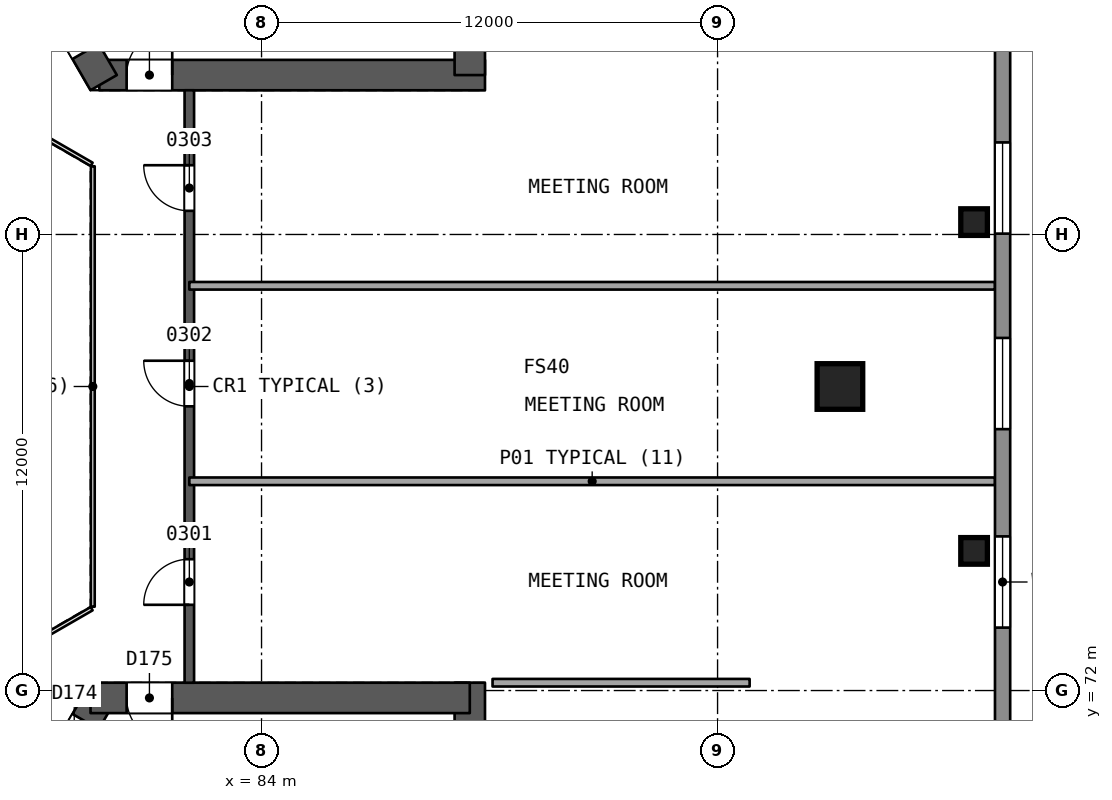
"""IFC4 building model, lengths in metres.
Left out: names, types, materials, properties, quantities, classifications, styles, units other than length and angle.
Written with IfcOpenShell. Run it as: python <this file> out.ifc"""

import sys

from ifc_helpers import new_model, si_unit, direction, frame, frame_2d, origin, origin_2d, place, context, subcontext, project, spatial, rectangle, extrude, element, fill, save


model = new_model("IFC4")
c1 = context("Model", 3, precision=1e-05, world=origin(), true_north=direction((0.0, 1.0)))
c2 = subcontext(c1, "Body", "Model", "MODEL_VIEW")
j1 = project(units=[si_unit("LENGTHUNIT", "METRE"), si_unit("PLANEANGLEUNIT", "RADIAN")], contexts=[c1])
p1 = place(None, origin())
s1 = spatial("IfcSite", under=j1, at=p1, CompositionType="ELEMENT")
p2 = place(p1, origin())
s2 = spatial("IfcBuilding", under=s1, at=p2, CompositionType="ELEMENT")
p3 = place(p2, frame((0.0, 0.0, 20.4)))
s3 = spatial("IfcBuildingStorey", under=s2, at=p3, CompositionType="ELEMENT", Elevation=20.4)
p4 = place(p3, frame((79.731, 88.194, 0.0), z_axis=(0.0, 0.0, 1.0), x_axis=(1.0, 0.0, 0.0)))
e1 = element("IfcWall", 1, at=p4, inside=s3, PredefinedType="SHEAR", context=c2, shape_type="SweptSolid", body=[
    extrude(rectangle(XDim=10.149, YDim=0.8, at=frame_2d((5.074, 0.0))), origin(), (0.0, 0.0, 1.0), 5.0),
])
p5 = place(p4, frame((0.719, 0.0, 0.0)))
e2 = element("IfcOpeningElement", 2, at=p5, cuts=e1, PredefinedType="OPENING", context=c2, shape_type="SweptSolid", body=[
    extrude(rectangle(XDim=1.2, YDim=2.1, at=frame_2d((0.6, 1.05))), frame((0.0, 0.411, 0.0), z_axis=(0.0, -1.0, 0.0), x_axis=(1.0, 0.0, 0.0)), (0.0, 0.0, 1.0), 0.821),
])
p6 = place(p3, frame((89.48, 88.194, 0.0), z_axis=(0.0, 0.0, 1.0), x_axis=(0.0, 1.0, 0.0)))
e3 = element("IfcWall", 3, at=p6, inside=s3, PredefinedType="SHEAR", context=c2, shape_type="SweptSolid", body=[
    extrude(rectangle(XDim=13.933, YDim=0.8, at=frame_2d((6.967, 0.0))), origin(), (0.0, 0.0, 1.0), 5.0),
])
p7 = place(p3, frame((74.856, 96.637, 0.0), z_axis=(0.0, 0.0, 1.0), x_axis=(0.499993500917, -0.866029155999, 0.0)))
e4 = element("IfcWall", 4, at=p7, inside=s3, PredefinedType="SHEAR", context=c2, shape_type="SweptSolid", body=[
    extrude(rectangle(XDim=9.98, YDim=0.8, at=frame_2d((4.99, 0.0))), origin(), (0.0, 0.0, 1.0), 5.0),
])
p8 = place(p7, frame((7.83, 0.0, 0.0)))
e5 = element("IfcOpeningElement", 5, at=p8, cuts=e4, PredefinedType="OPENING", context=c2, shape_type="SweptSolid", body=[
    extrude(rectangle(XDim=1.2, YDim=2.1, at=frame_2d((0.6, 1.05))), frame((0.0, 0.411, 0.0), z_axis=(0.0, -1.0, 0.0), x_axis=(1.0, 0.0, 0.0)), (0.0, 0.0, 1.0), 0.821),
])
p9 = place(p3, frame((79.731, 71.806, 0.0), z_axis=(0.0, 0.0, 1.0), x_axis=(-0.49999662545, -0.866027352073, 0.0)))
e6 = element("IfcWall", 6, at=p9, inside=s3, PredefinedType="SHEAR", context=c2, shape_type="SweptSolid", body=[
    extrude(rectangle(XDim=10.149, YDim=0.8, at=frame_2d((5.074, 0.0))), origin(), (0.0, 0.0, 1.0), 5.0),
])
p10 = place(p9, frame((0.719, 0.0, 0.0)))
e7 = element("IfcOpeningElement", 7, at=p10, cuts=e6, PredefinedType="OPENING", context=c2, shape_type="SweptSolid", body=[
    extrude(rectangle(XDim=1.2, YDim=2.1, at=frame_2d((0.6, 1.05))), frame((0.0, 0.411, 0.0), z_axis=(0.0, -1.0, 0.0), x_axis=(1.0, 0.0, 0.0)), (0.0, 0.0, 1.0), 0.821),
])
p11 = place(p3, frame((89.48, 58.103, 0.0), z_axis=(0.0, 0.0, 1.0), x_axis=(0.0, 1.0, 0.0)))
e8 = element("IfcWall", 8, at=p11, inside=s3, PredefinedType="SHEAR", context=c2, shape_type="SweptSolid", body=[
    extrude(rectangle(XDim=14.103, YDim=0.8, at=frame_2d((7.051, 0.0))), origin(), (0.0, 0.0, 1.0), 5.0),
])
p12 = place(p3, frame((89.48, 71.806, 0.0), z_axis=(0.0, 0.0, 1.0), x_axis=(-1.0, 0.0, 0.0)))
e9 = element("IfcWall", 9, at=p12, inside=s3, PredefinedType="SHEAR", context=c2, shape_type="SweptSolid", body=[
    extrude(rectangle(XDim=9.98, YDim=0.8, at=frame_2d((4.99, 0.0))), origin(), (0.0, 0.0, 1.0), 5.0),
])
p13 = place(p12, frame((7.83, 0.0, 0.0)))
e10 = element("IfcOpeningElement", 10, at=p13, cuts=e9, PredefinedType="OPENING", context=c2, shape_type="SweptSolid", body=[
    extrude(rectangle(XDim=1.2, YDim=2.1, at=frame_2d((0.6, 1.05))), frame((0.0, 0.411, 0.0), z_axis=(0.0, -1.0, 0.0), x_axis=(1.0, 0.0, 0.0)), (0.0, 0.0, 1.0), 0.821),
])
p14 = place(p3, frame((82.1, 72.206, 0.0), z_axis=(0.0, 0.0, 1.0), x_axis=(0.0, 1.0, 0.0)))
e11 = element("IfcWall", 11, at=p14, inside=s3, PredefinedType="SHEAR", context=c2, shape_type="SweptSolid", body=[
    extrude(rectangle(XDim=15.588, YDim=0.25, at=frame_2d((7.794, 0.0))), origin(), (0.0, 0.0, 1.0), 4.5),
])
p15 = place(p14, frame((2.05, 0.0, 0.0)))
e12 = element("IfcOpeningElement", 12, at=p15, cuts=e11, PredefinedType="OPENING", context=c2, shape_type="SweptSolid", body=[
    extrude(rectangle(XDim=1.2, YDim=2.4, at=frame_2d((0.6, 1.2))), frame((0.0, 0.135, 0.0), z_axis=(0.0, -1.0, 0.0), x_axis=(1.0, 0.0, 0.0)), (0.0, 0.0, 1.0), 0.271),
])
p16 = place(p14, frame((7.272, 0.0, 0.0)))
e13 = element("IfcOpeningElement", 13, at=p16, cuts=e11, PredefinedType="OPENING", context=c2, shape_type="SweptSolid", body=[
    extrude(rectangle(XDim=1.2, YDim=2.4, at=frame_2d((0.6, 1.2))), frame((0.0, 0.135, 0.0), z_axis=(0.0, -1.0, 0.0), x_axis=(1.0, 0.0, 0.0)), (0.0, 0.0, 1.0), 0.271),
])
p17 = place(p14, frame((12.417, 0.0, 0.0)))
e14 = element("IfcOpeningElement", 14, at=p17, cuts=e11, PredefinedType="OPENING", context=c2, shape_type="SweptSolid", body=[
    extrude(rectangle(XDim=1.2, YDim=2.4, at=frame_2d((0.6, 1.2))), frame((0.0, 0.135, 0.0), z_axis=(0.0, -1.0, 0.0), x_axis=(1.0, 0.0, 0.0)), (0.0, 0.0, 1.0), 0.271),
])
p18 = place(p3, frame((99.244, 80.0, 0.0), z_axis=(-0.020210714719, 0.0, 0.999795742645), x_axis=(0.0, -1.0, 0.0)))
e15 = element("IfcColumn", 15, at=p18, inside=s3, PredefinedType="COLUMN", context=c2, shape_type="SweptSolid", body=[
    extrude(rectangle(XDim=1.2, YDim=1.2, at=origin_2d()), origin(), (0.0, 0.0, 1.0), 5.001),
])
for number, where, z_axis, x_axis in (
    (16, (102.75, 75.674, 0.0), (0.0, 0.0, 1.0), (1.0, 0.0, 0.0)),
    (17, (102.75, 84.326, 0.0), (0.0, 0.0, 1.0), (1.0, 0.0, 0.0)),
):
    element("IfcColumn", number, at=place(p3, frame(where, z_axis=z_axis, x_axis=x_axis)), inside=s3, PredefinedType="COLUMN", context=c2, shape_type="SweptSolid", body=[
        extrude(rectangle(XDim=0.7, YDim=0.7, at=origin_2d()), origin(), (0.0, 0.0, 1.0), 5.0),
    ])
p19 = place(p3, frame((103.301, 77.506, 0.0), z_axis=(0.0, 0.0, 1.0), x_axis=(-1.0, 0.0, 0.0)))
e18 = element("IfcWall", 18, at=p19, inside=s3, PredefinedType="PARTITIONING", context=c2, shape_type="SweptSolid", body=[
    extrude(rectangle(XDim=21.201, YDim=0.2, at=frame_2d((10.601, 0.0))), origin(), (0.0, 0.0, 1.0), 4.5),
])
p20 = place(p3, frame((90.079, 72.206, 0.0), z_axis=(0.0, 0.0, 1.0), x_axis=(1.0, 0.0, 0.0)))
e19 = element("IfcWall", 19, at=p20, inside=s3, PredefinedType="PARTITIONING", context=c2, shape_type="SweptSolid", body=[
    extrude(rectangle(XDim=6.765, YDim=0.2, at=frame_2d((3.382, 0.0))), origin(), (0.0, 0.0, 1.0), 4.5),
])
p21 = place(p3, frame((103.301, 82.65, 0.0), z_axis=(0.0, 0.0, 1.0), x_axis=(-1.0, 0.0, 0.0)))
e20 = element("IfcWall", 20, at=p21, inside=s3, PredefinedType="PARTITIONING", context=c2, shape_type="SweptSolid", body=[
    extrude(rectangle(XDim=21.201, YDim=0.2, at=frame_2d((10.601, 0.0))), origin(), (0.0, 0.0, 1.0), 4.5),
])
p22 = place(p3, frame((103.5, 119.364, 0.0), z_axis=(0.0, 0.0, 1.0), x_axis=(0.0, -1.0, 0.0)))
e21 = element("IfcWall", 21, at=p22, inside=s3, PredefinedType="SOLIDWALL", context=c2, shape_type="SweptSolid", body=[
    extrude(rectangle(XDim=78.727, YDim=0.4, at=frame_2d((39.364, 0.0))), origin(), (0.0, 0.0, 1.0), 4.5),
])
p23 = place(p22, frame((43.308, 0.0, 0.9)))
e22 = element("IfcOpeningElement", 22, at=p23, cuts=e21, PredefinedType="OPENING", context=c2, shape_type="SweptSolid", body=[
    extrude(rectangle(XDim=2.4, YDim=2.4, at=frame_2d((1.2, 1.2))), frame((0.0, 0.21, 0.0), z_axis=(0.0, -1.0, 0.0), x_axis=(1.0, 0.0, 0.0)), (0.0, 0.0, 1.0), 0.421),
])
p24 = place(p22, frame((38.085, 0.0, 0.9)))
e23 = element("IfcOpeningElement", 23, at=p24, cuts=e21, PredefinedType="OPENING", context=c2, shape_type="SweptSolid", body=[
    extrude(rectangle(XDim=2.4, YDim=2.4, at=frame_2d((1.2, 1.2))), frame((0.0, 0.21, 0.0), z_axis=(0.0, -1.0, 0.0), x_axis=(1.0, 0.0, 0.0)), (0.0, 0.0, 1.0), 0.421),
])
p25 = place(p22, frame((32.941, 0.0, 0.9)))
e24 = element("IfcOpeningElement", 24, at=p25, cuts=e21, PredefinedType="OPENING", context=c2, shape_type="SweptSolid", body=[
    extrude(rectangle(XDim=2.4, YDim=2.4, at=frame_2d((1.2, 1.2))), frame((0.0, 0.21, 0.0), z_axis=(0.0, -1.0, 0.0), x_axis=(1.0, 0.0, 0.0)), (0.0, 0.0, 1.0), 0.421),
])
p26 = place(p3, frame((26.66, 85.0, 0.0), z_axis=(0.0, 0.0, 1.0), x_axis=(0.866025599265, 0.499999661418, 0.0)))
e25 = element("IfcWall", 25, at=p26, inside=s3, PredefinedType="SOLIDWALL", context=c2, shape_type="SweptSolid", body=[
    extrude(rectangle(XDim=78.727, YDim=0.4, at=frame_2d((39.364, 0.0))), origin(), (0.0, 0.0, 1.0), 4.5),
])
p27 = place(p26, frame((42.84, 0.0, 0.9)))
e26 = element("IfcOpeningElement", 26, at=p27, cuts=e25, PredefinedType="OPENING", context=c2, shape_type="SweptSolid", body=[
    extrude(rectangle(XDim=2.4, YDim=2.4, at=frame_2d((1.2, 1.2))), frame((0.0, 0.21, 0.0), z_axis=(0.0, -1.0, 0.0), x_axis=(1.0, 0.0, 0.0)), (0.0, 0.0, 1.0), 0.421),
])
p28 = place(p26, frame((37.385, 0.0, 0.9)))
e27 = element("IfcOpeningElement", 27, at=p28, cuts=e25, PredefinedType="OPENING", context=c2, shape_type="SweptSolid", body=[
    extrude(rectangle(XDim=2.4, YDim=2.4, at=frame_2d((1.2, 1.2))), frame((0.0, 0.21, 0.0), z_axis=(0.0, -1.0, 0.0), x_axis=(1.0, 0.0, 0.0)), (0.0, 0.0, 1.0), 0.421),
])
p29 = place(p26, frame((32.708, 0.0, 0.9)))
e28 = element("IfcOpeningElement", 28, at=p29, cuts=e25, PredefinedType="OPENING", context=c2, shape_type="SweptSolid", body=[
    extrude(rectangle(XDim=2.4, YDim=2.4, at=frame_2d((1.2, 1.2))), frame((0.0, 0.21, 0.0), z_axis=(0.0, -1.0, 0.0), x_axis=(1.0, 0.0, 0.0)), (0.0, 0.0, 1.0), 0.421),
])
p30 = place(p3, frame((94.84, 35.636, 0.0), z_axis=(0.0, 0.0, 1.0), x_axis=(-0.866025599265, 0.499999661418, 0.0)))
e29 = element("IfcWall", 29, at=p30, inside=s3, PredefinedType="SOLIDWALL", context=c2, shape_type="SweptSolid", body=[
    extrude(rectangle(XDim=78.727, YDim=0.4, at=frame_2d((39.364, 0.0))), origin(), (0.0, 0.0, 1.0), 4.5),
])
p31 = place(p30, frame((42.061, 0.0, 0.9)))
e30 = element("IfcOpeningElement", 30, at=p31, cuts=e29, PredefinedType="OPENING", context=c2, shape_type="SweptSolid", body=[
    extrude(rectangle(XDim=2.4, YDim=2.4, at=frame_2d((1.2, 1.2))), frame((0.0, 0.21, 0.0), z_axis=(0.0, -1.0, 0.0), x_axis=(1.0, 0.0, 0.0)), (0.0, 0.0, 1.0), 0.421),
])
p32 = place(p30, frame((36.215, 0.0, 0.9)))
e31 = element("IfcOpeningElement", 31, at=p32, cuts=e29, PredefinedType="OPENING", context=c2, shape_type="SweptSolid", body=[
    extrude(rectangle(XDim=2.4, YDim=2.4, at=frame_2d((1.2, 1.2))), frame((0.0, 0.21, 0.0), z_axis=(0.0, -1.0, 0.0), x_axis=(1.0, 0.0, 0.0)), (0.0, 0.0, 1.0), 0.421),
])
p33 = place(p30, frame((32.318, 0.0, 0.9)))
e32 = element("IfcOpeningElement", 32, at=p33, cuts=e29, PredefinedType="OPENING", context=c2, shape_type="SweptSolid", body=[
    extrude(rectangle(XDim=2.4, YDim=2.4, at=frame_2d((1.2, 1.2))), frame((0.0, 0.21, 0.0), z_axis=(0.0, -1.0, 0.0), x_axis=(1.0, 0.0, 0.0)), (0.0, 0.0, 1.0), 0.421),
])
p34 = place(p3, frame((79.56, 74.206, 0.0), z_axis=(0.0, 0.0, 1.0), x_axis=(0.0, 1.0, 0.0)))
e33 = element("IfcWall", 33, at=p34, inside=s3, PredefinedType="PARTITIONING", context=c2, shape_type="SweptSolid", body=[
    extrude(rectangle(XDim=11.588, YDim=0.1, at=frame_2d((5.794, 0.0))), origin(), (0.0, 0.0, 1.0), 4.5),
])
for number, where, z_axis, x_axis in (
    (34, (79.53, 85.846, 0.0), (0.0, 0.0, 1.0), (-0.866, 0.5, 0.0)),
    (35, (77.798, 73.154, 0.0), (0.0, 0.0, 1.0), (0.866, 0.5, 0.0)),
):
    element("IfcWall", number, at=place(p3, frame(where, z_axis=z_axis, x_axis=x_axis)), inside=s3, PredefinedType="PARTITIONING", context=c2, shape_type="SweptSolid", body=[
        extrude(rectangle(XDim=2.0, YDim=0.1, at=frame_2d((1.0, 0.0))), origin(), (0.0, 0.0, 1.0), 4.5),
    ])
p35 = place(p15, origin())
e36 = element("IfcDoor", 36, at=p35, inside=s3, OperationType="SINGLE_SWING_LEFT", PredefinedType="NOTDEFINED", context=c2, shape_type="SweptSolid", body=[
    extrude(rectangle(XDim=1.2, YDim=2.4, at=frame_2d((0.6, 1.2))), frame((0.0, 0.025, 0.0), z_axis=(0.0, -1.0, 0.0), x_axis=(1.0, 0.0, 0.0)), (0.0, 0.0, 1.0), 0.05),
])
fill(e12, e36)
p36 = place(p16, origin())
e37 = element("IfcDoor", 37, at=p36, inside=s3, OperationType="SINGLE_SWING_RIGHT", PredefinedType="NOTDEFINED", context=c2, shape_type="SweptSolid", body=[
    extrude(rectangle(XDim=1.2, YDim=2.4, at=frame_2d((0.6, 1.2))), frame((0.0, 0.025, 0.0), z_axis=(0.0, -1.0, 0.0), x_axis=(1.0, 0.0, 0.0)), (0.0, 0.0, 1.0), 0.05),
])
fill(e13, e37)
p37 = place(p17, origin())
e38 = element("IfcDoor", 38, at=p37, inside=s3, OperationType="SINGLE_SWING_RIGHT", PredefinedType="NOTDEFINED", context=c2, shape_type="SweptSolid", body=[
    extrude(rectangle(XDim=1.2, YDim=2.4, at=frame_2d((0.6, 1.2))), frame((0.0, 0.025, 0.0), z_axis=(0.0, -1.0, 0.0), x_axis=(1.0, 0.0, 0.0)), (0.0, 0.0, 1.0), 0.05),
])
fill(e14, e38)
p38 = place(p23, origin())
e39 = element("IfcWindow", 39, at=p38, inside=s3, PartitioningType="SINGLE_PANEL", PredefinedType="WINDOW", context=c2, shape_type="SweptSolid", body=[
    extrude(rectangle(XDim=2.4, YDim=2.4, at=frame_2d((1.2, 1.2))), frame((0.0, 0.03, 0.0), z_axis=(0.0, -1.0, 0.0), x_axis=(1.0, 0.0, 0.0)), (0.0, 0.0, 1.0), 0.06),
])
fill(e22, e39)
p39 = place(p24, origin())
e40 = element("IfcWindow", 40, at=p39, inside=s3, PartitioningType="SINGLE_PANEL", PredefinedType="WINDOW", context=c2, shape_type="SweptSolid", body=[
    extrude(rectangle(XDim=2.4, YDim=2.4, at=frame_2d((1.2, 1.2))), frame((0.0, 0.03, 0.0), z_axis=(0.0, -1.0, 0.0), x_axis=(1.0, 0.0, 0.0)), (0.0, 0.0, 1.0), 0.06),
])
fill(e23, e40)
p40 = place(p25, origin())
e41 = element("IfcWindow", 41, at=p40, inside=s3, PartitioningType="SINGLE_PANEL", PredefinedType="WINDOW", context=c2, shape_type="SweptSolid", body=[
    extrude(rectangle(XDim=2.4, YDim=2.4, at=frame_2d((1.2, 1.2))), frame((0.0, 0.03, 0.0), z_axis=(0.0, -1.0, 0.0), x_axis=(1.0, 0.0, 0.0)), (0.0, 0.0, 1.0), 0.06),
])
fill(e24, e41)
p41 = place(p5, origin())
e42 = element("IfcDoor", 42, at=p41, inside=s3, OperationType="SINGLE_SWING_RIGHT", PredefinedType="NOTDEFINED", context=c2, shape_type="SweptSolid", body=[
    extrude(rectangle(XDim=1.2, YDim=2.1, at=frame_2d((0.6, 1.05))), frame((0.0, 0.025, 0.0), z_axis=(0.0, -1.0, 0.0), x_axis=(1.0, 0.0, 0.0)), (0.0, 0.0, 1.0), 0.05),
])
fill(e2, e42)
p42 = place(p13, origin())
e43 = element("IfcDoor", 43, at=p42, inside=s3, OperationType="SINGLE_SWING_LEFT", PredefinedType="NOTDEFINED", context=c2, shape_type="SweptSolid", body=[
    extrude(rectangle(XDim=1.2, YDim=2.1, at=frame_2d((0.6, 1.05))), frame((0.0, 0.025, 0.0), z_axis=(0.0, -1.0, 0.0), x_axis=(1.0, 0.0, 0.0)), (0.0, 0.0, 1.0), 0.05),
])
fill(e10, e43)
save(model, sys.argv[1])
